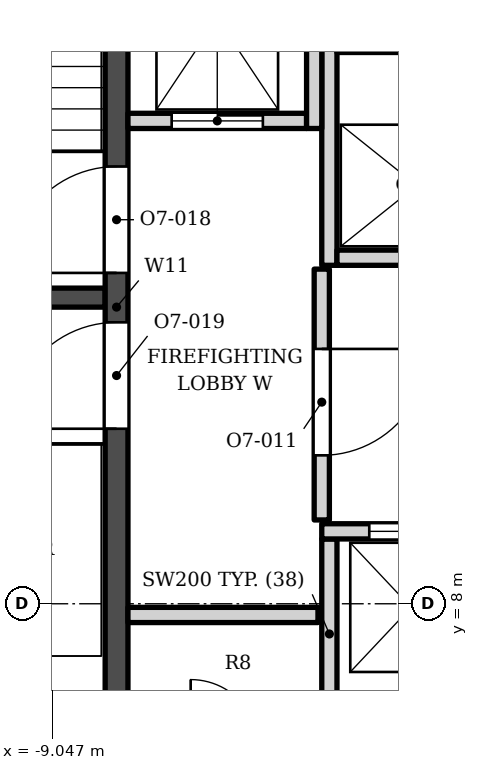
"""IFC4 building model, lengths in metres.
Left out: names, types, materials, properties, quantities, classifications, styles, units other than length and angle.
Written with IfcOpenShell. Run it as: python <this file> out.ifc"""

import sys

from ifc_helpers import new_model, si_unit, direction, frame, frame_2d, origin, place, context, subcontext, project, spatial, rectangle, extrude, element, fill, save


model = new_model("IFC4")
c1 = context("Model", 3, precision=1e-05, world=origin(), true_north=direction((0.0, 1.0)))
c2 = subcontext(c1, "Body", "Model", "MODEL_VIEW")
j1 = project(units=[si_unit("LENGTHUNIT", "METRE"), si_unit("PLANEANGLEUNIT", "RADIAN")], contexts=[c1])
p1 = place(None, origin())
s1 = spatial("IfcSite", under=j1, at=p1, CompositionType="ELEMENT")
p2 = place(p1, origin())
s2 = spatial("IfcBuilding", under=s1, at=p2, CompositionType="ELEMENT")
p3 = place(p2, frame((0.0, 0.0, 219.8)))
s3 = spatial("IfcBuildingStorey", under=s2, at=p3, CompositionType="ELEMENT", Elevation=219.8)
p4 = place(p3, frame((-8.2, 5.253, 0.0), z_axis=(0.0, 0.0, 1.0), x_axis=(0.0, 1.0, 0.0)))
e1 = element("IfcWall", 1, at=p4, inside=s3, PredefinedType="SHEAR", context=c2, shape_type="SweptSolid", body=[
    extrude(rectangle(XDim=13.3, YDim=0.3, at=frame_2d((6.65, 0.0))), origin(), (0.0, 0.0, 1.0), 3.9),
])
p5 = place(p4, frame((7.1, 0.0, 0.0)))
e2 = element("IfcOpeningElement", 2, at=p5, cuts=e1, PredefinedType="OPENING", context=c2, shape_type="SweptSolid", body=[
    extrude(rectangle(XDim=1.4, YDim=2.1, at=frame_2d((0.7, 1.05))), frame((0.0, 0.16, 0.0), z_axis=(0.0, -1.0, 0.0), x_axis=(1.0, 0.0, 0.0)), (0.0, 0.0, 1.0), 0.32),
])
p6 = place(p4, frame((5.05, 0.0, 0.0)))
e3 = element("IfcOpeningElement", 3, at=p6, cuts=e1, PredefinedType="OPENING", context=c2, shape_type="SweptSolid", body=[
    extrude(rectangle(XDim=1.4, YDim=2.1, at=frame_2d((0.7, 1.05))), frame((0.0, 0.16, 0.0), z_axis=(0.0, -1.0, 0.0), x_axis=(1.0, 0.0, 0.0)), (0.0, 0.0, 1.0), 0.32),
])
p7 = place(p3, frame((-12.1, 12.028, 0.0), z_axis=(0.0, 0.0, 1.0), x_axis=(1.0, 0.0, 0.0)))
e4 = element("IfcWall", 4, at=p7, inside=s3, PredefinedType="SHEAR", context=c2, shape_type="SweptSolid", body=[
    extrude(rectangle(XDim=3.75, YDim=0.25, at=frame_2d((1.875, 0.0))), origin(), (0.0, 0.0, 1.0), 3.9),
])
for number, where, z_axis, x_axis in (
    (5, (-5.4, 6.353, 0.0), (0.0, 0.0, 1.0), (0.0, 1.0, 0.0)),
    (6, (-8.05, 7.853, 0.0), (0.0, 0.0, 1.0), (1.0, 0.0, 0.0)),
):
    element("IfcWall", number, at=place(p3, frame(where, z_axis=z_axis, x_axis=x_axis)), inside=s3, PredefinedType="SOLIDWALL", context=c2, shape_type="SweptSolid", body=[
        extrude(rectangle(XDim=2.5, YDim=0.2, at=frame_2d((1.25, 0.0))), origin(), (0.0, 0.0, 1.0), 3.73),
    ])
p8 = place(p3, frame((-5.5, 8.953, 0.0), z_axis=(0.0, 0.0, 1.0), x_axis=(1.0, 0.0, 0.0)))
e7 = element("IfcWall", 7, at=p8, inside=s3, PredefinedType="SOLIDWALL", context=c2, shape_type="SweptSolid", body=[
    extrude(rectangle(XDim=4.5, YDim=0.2, at=frame_2d((2.25, 0.0))), origin(), (0.0, 0.0, 1.0), 3.73),
])
p9 = place(p8, frame((0.625, 0.0, 0.0)))
e8 = element("IfcOpeningElement", 8, at=p9, cuts=e7, PredefinedType="OPENING", context=c2, shape_type="SweptSolid", body=[
    extrude(rectangle(XDim=1.1, YDim=2.1, at=frame_2d((0.55, 1.05))), frame((0.0, 0.11, 0.0), z_axis=(0.0, -1.0, 0.0), x_axis=(1.0, 0.0, 0.0)), (0.0, 0.0, 1.0), 0.22),
])
p10 = place(p8, frame((2.775, 0.0, 0.0)))
e9 = element("IfcOpeningElement", 9, at=p10, cuts=e7, PredefinedType="OPENING", context=c2, shape_type="SweptSolid", body=[
    extrude(rectangle(XDim=1.1, YDim=2.1, at=frame_2d((0.55, 1.05))), frame((0.0, 0.11, 0.0), z_axis=(0.0, -1.0, 0.0), x_axis=(1.0, 0.0, 0.0)), (0.0, 0.0, 1.0), 0.22),
])
p11 = place(p3, frame((-5.5, 9.103, 0.0), z_axis=(0.0, 0.0, 1.0), x_axis=(0.0, 1.0, 0.0)))
e10 = element("IfcWall", 10, at=p11, inside=s3, PredefinedType="SOLIDWALL", context=c2, shape_type="SweptSolid", body=[
    extrude(rectangle(XDim=3.3, YDim=0.2, at=frame_2d((1.65, 0.0))), origin(), (0.0, 0.0, 1.0), 3.73),
])
p12 = place(p11, frame((0.85, 0.0, 0.0)))
e11 = element("IfcOpeningElement", 11, at=p12, cuts=e10, PredefinedType="OPENING", context=c2, shape_type="SweptSolid", body=[
    extrude(rectangle(XDim=1.4, YDim=2.1, at=frame_2d((0.7, 1.05))), frame((0.0, 0.11, 0.0), z_axis=(0.0, -1.0, 0.0), x_axis=(1.0, 0.0, 0.0)), (0.0, 0.0, 1.0), 0.22),
])
p13 = place(p3, frame((-5.4, 12.453, 0.0), z_axis=(0.0, 0.0, 1.0), x_axis=(0.0, 1.0, 0.0)))
e12 = element("IfcWall", 12, at=p13, inside=s3, PredefinedType="SOLIDWALL", context=c2, shape_type="SweptSolid", body=[
    extrude(rectangle(XDim=3.0, YDim=0.2, at=frame_2d((1.5, 0.0))), origin(), (0.0, 0.0, 1.0), 3.73),
])
p14 = place(p3, frame((-5.3, 12.552, 0.0), z_axis=(0.0, 0.0, 1.0), x_axis=(1.0, 0.0, 0.0)))
e13 = element("IfcWall", 13, at=p14, inside=s3, PredefinedType="SOLIDWALL", context=c2, shape_type="SweptSolid", body=[
    extrude(rectangle(XDim=2.1, YDim=0.2, at=frame_2d((1.05, 0.0))), origin(), (0.0, 0.0, 1.0), 3.73),
])
p15 = place(p3, frame((-8.05, 14.353, 0.0), z_axis=(0.0, 0.0, 1.0), x_axis=(1.0, 0.0, 0.0)))
e14 = element("IfcWall", 14, at=p15, inside=s3, PredefinedType="SOLIDWALL", context=c2, shape_type="SweptSolid", body=[
    extrude(rectangle(XDim=2.35, YDim=0.2, at=frame_2d((1.175, 0.0))), origin(), (0.0, 0.0, 1.0), 3.73),
])
p16 = place(p15, frame((0.575, 0.0, 0.0)))
e15 = element("IfcOpeningElement", 15, at=p16, cuts=e14, PredefinedType="OPENING", context=c2, shape_type="SweptSolid", body=[
    extrude(rectangle(XDim=1.2, YDim=2.1, at=frame_2d((0.6, 1.05))), frame((0.0, 0.11, 0.0), z_axis=(0.0, -1.0, 0.0), x_axis=(1.0, 0.0, 0.0)), (0.0, 0.0, 1.0), 0.22),
])
p17 = place(p3, frame((-5.6, 14.253, 0.0), z_axis=(0.0, 0.0, 1.0), x_axis=(0.0, 1.0, 0.0)))
e16 = element("IfcWall", 16, at=p17, inside=s3, PredefinedType="SOLIDWALL", context=c2, shape_type="SweptSolid", body=[
    extrude(rectangle(XDim=4.3, YDim=0.2, at=frame_2d((2.15, 0.0))), origin(), (0.0, 0.0, 1.0), 3.73),
])
p18 = place(p3, frame((-5.3, 15.353, 0.0), z_axis=(0.0, 0.0, 1.0), x_axis=(1.0, 0.0, 0.0)))
e17 = element("IfcWall", 17, at=p18, inside=s3, PredefinedType="SOLIDWALL", context=c2, shape_type="SweptSolid", body=[
    extrude(rectangle(XDim=2.1, YDim=0.2, at=frame_2d((1.05, 0.0))), origin(), (0.0, 0.0, 1.0), 3.73),
])
p19 = place(p9, origin())
e18 = element("IfcDoor", 18, at=p19, inside=s3, OperationType="DOUBLE_DOOR_SLIDING", PredefinedType="DOOR", context=c2, shape_type="SweptSolid", body=[
    extrude(rectangle(XDim=1.1, YDim=2.1, at=frame_2d((0.55, 1.05))), frame((0.0, 0.025, 0.0), z_axis=(0.0, -1.0, 0.0), x_axis=(1.0, 0.0, 0.0)), (0.0, 0.0, 1.0), 0.05),
])
fill(e8, e18)
p20 = place(p16, origin())
e19 = element("IfcDoor", 19, at=p20, inside=s3, OperationType="DOUBLE_DOOR_SLIDING", PredefinedType="DOOR", context=c2, shape_type="SweptSolid", body=[
    extrude(rectangle(XDim=1.2, YDim=2.1, at=frame_2d((0.6, 1.05))), frame((0.0, 0.025, 0.0), z_axis=(0.0, -1.0, 0.0), x_axis=(1.0, 0.0, 0.0)), (0.0, 0.0, 1.0), 0.05),
])
fill(e15, e19)
p21 = place(p5, origin())
e20 = element("IfcDoor", 20, at=p21, inside=s3, OperationType="SINGLE_SWING_LEFT", PredefinedType="DOOR", context=c2, shape_type="SweptSolid", body=[
    extrude(rectangle(XDim=1.4, YDim=2.1, at=frame_2d((0.7, 1.05))), frame((0.0, 0.025, 0.0), z_axis=(0.0, -1.0, 0.0), x_axis=(1.0, 0.0, 0.0)), (0.0, 0.0, 1.0), 0.05),
])
fill(e2, e20)
p22 = place(p6, origin())
e21 = element("IfcDoor", 21, at=p22, inside=s3, OperationType="SINGLE_SWING_LEFT", PredefinedType="DOOR", context=c2, shape_type="SweptSolid", body=[
    extrude(rectangle(XDim=1.4, YDim=2.1, at=frame_2d((0.7, 1.05))), frame((0.0, 0.025, 0.0), z_axis=(0.0, -1.0, 0.0), x_axis=(1.0, 0.0, 0.0)), (0.0, 0.0, 1.0), 0.05),
])
fill(e3, e21)
p23 = place(p12, origin())
e22 = element("IfcDoor", 22, at=p23, inside=s3, OperationType="SINGLE_SWING_RIGHT", PredefinedType="DOOR", context=c2, shape_type="SweptSolid", body=[
    extrude(rectangle(XDim=1.4, YDim=2.1, at=frame_2d((0.7, 1.05))), frame((0.0, 0.025, 0.0), z_axis=(0.0, -1.0, 0.0), x_axis=(1.0, 0.0, 0.0)), (0.0, 0.0, 1.0), 0.05),
])
fill(e11, e22)
save(model, sys.argv[1])
